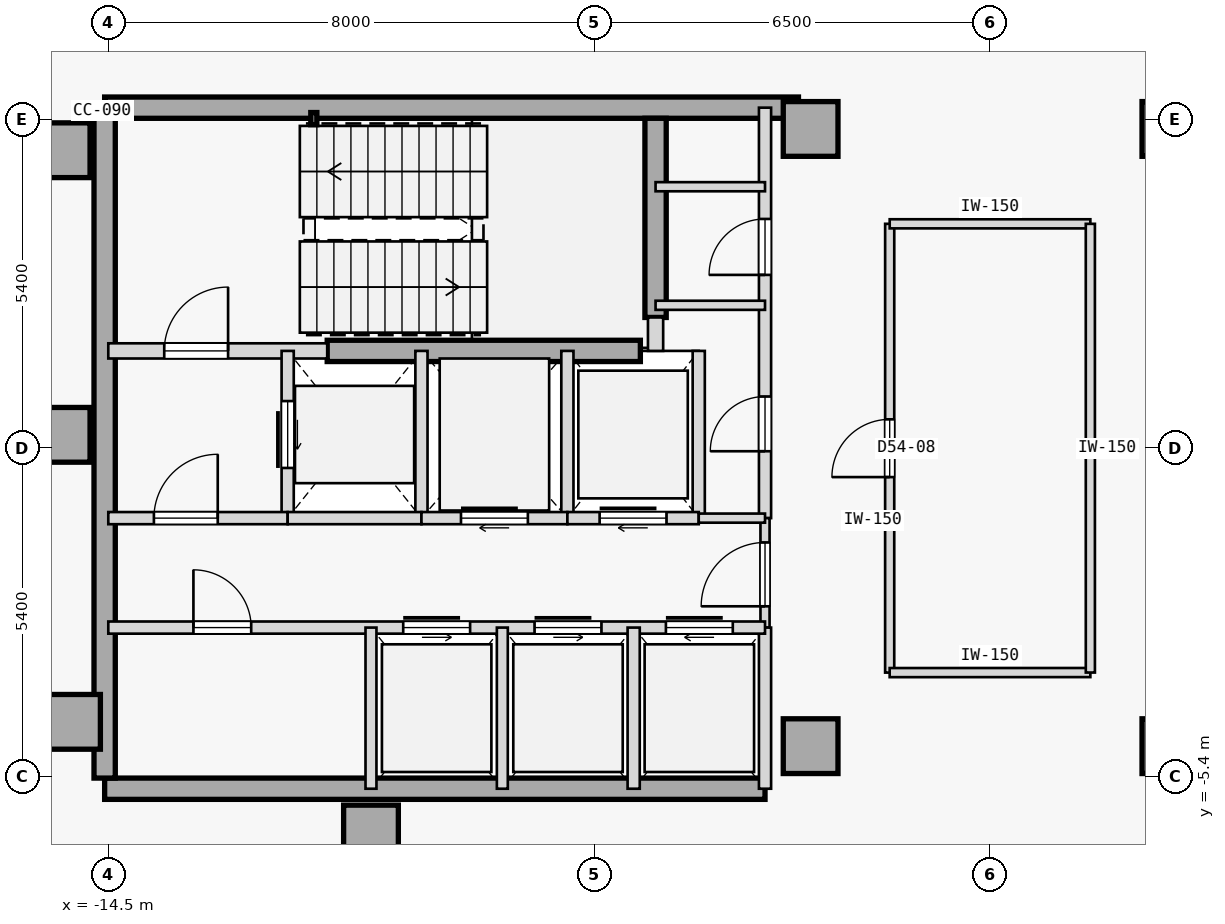
"""IFC4 building model, lengths in metres.
Left out: names, types, materials, properties, quantities, classifications, styles, units other than length and angle.
Written with IfcOpenShell. Run it as: python <this file> out.ifc"""

import sys

from ifc_helpers import new_model, si_unit, direction, frame, frame_2d, origin, origin_2d, place, context, subcontext, project, spatial, rectangle, hollow_rectangle, extrude, element, fill, save


model = new_model("IFC4")
c1 = context("Model", 3, precision=1e-05, world=origin(), true_north=direction((0.0, 1.0)))
c2 = subcontext(c1, "Body", "Model", "MODEL_VIEW")
j1 = project(units=[si_unit("LENGTHUNIT", "METRE"), si_unit("PLANEANGLEUNIT", "RADIAN")], contexts=[c1])
p1 = place(None, origin())
s1 = spatial("IfcSite", under=j1, at=p1, CompositionType="ELEMENT")
p2 = place(p1, origin())
s2 = spatial("IfcBuilding", under=s1, at=p2, CompositionType="ELEMENT")
p3 = place(p2, frame((0.0, 0.0, 206.8)))
s3 = spatial("IfcBuildingStorey", under=s2, at=p3, CompositionType="ELEMENT", Elevation=206.8)
for number, where, z_axis, x_axis in (
    (1, (-15.25, 4.9, 0.0), (0.0, 0.0, 1.0), (1.0, 0.0, 0.0)),
    (2, (-15.25, 0.22, 0.0), (0.0, 0.0, 1.0), (1.0, 0.0, 0.0)),
    (3, (-15.08, -4.5, 0.0), (0.0, 0.0, 1.0), (1.0, 0.0, 0.0)),
    (4, (-10.18, -6.32, 0.0), (0.0, 0.0, 1.0), (1.0, 0.0, 0.0)),
    (5, (-2.95, -4.9, 0.0), (0.0, 0.0, 1.0), (1.0, 0.0, 0.0)),
    (6, (-2.95, 5.25, 0.0), (0.0, 0.0, 1.0), (1.0, 0.0, 0.0)),
    (7, (2.95, -4.9, 0.0), (0.0, 0.0, 1.0), (1.0, 0.0, 0.0)),
    (8, (2.95, 5.25, 0.0), (0.0, 0.0, 1.0), (1.0, 0.0, 0.0)),
):
    element("IfcColumn", number, at=place(p3, frame(where, z_axis=z_axis, x_axis=x_axis)), inside=s3, PredefinedType="COLUMN", context=c2, shape_type="SweptSolid", body=[
        extrude(rectangle(XDim=0.9, YDim=0.9, at=origin_2d()), origin(), (0.0, 0.0, 1.0), 4.1),
    ])
p4 = place(p3, frame((-14.56, 5.6, 0.0), z_axis=(0.0, 0.0, 1.0), x_axis=(1.0, 0.0, 0.0)))
e9 = element("IfcWall", 9, at=p4, inside=s3, PredefinedType="SHEAR", context=c2, shape_type="SweptSolid", body=[
    extrude(rectangle(XDim=11.41, YDim=0.35, at=frame_2d((5.705, 0.0))), origin(), (0.0, 0.0, 1.0), 3.875),
])
p5 = place(p3, frame((-14.56, -5.6, 0.0), z_axis=(0.0, 0.0, 1.0), x_axis=(1.0, 0.0, 0.0)))
e10 = element("IfcWall", 10, at=p5, inside=s3, PredefinedType="SHEAR", context=c2, shape_type="SweptSolid", body=[
    extrude(rectangle(XDim=10.86, YDim=0.35, at=frame_2d((5.43, 0.0))), origin(), (0.0, 0.0, 1.0), 3.875),
])
p6 = place(p3, frame((-14.56, -5.425, 0.0), z_axis=(0.0, 0.0, 1.0), x_axis=(0.0, 1.0, 0.0)))
e11 = element("IfcWall", 11, at=p6, inside=s3, PredefinedType="SHEAR", context=c2, shape_type="SweptSolid", body=[
    extrude(rectangle(XDim=10.85, YDim=0.35, at=frame_2d((5.425, 0.0))), origin(), (0.0, 0.0, 1.0), 3.875),
])
p7 = place(p3, frame((-5.5, 2.15, 0.0), z_axis=(0.0, 0.0, 1.0), x_axis=(0.0, 1.0, 0.0)))
e12 = element("IfcWall", 12, at=p7, inside=s3, PredefinedType="SHEAR", context=c2, shape_type="SweptSolid", body=[
    extrude(rectangle(XDim=3.275, YDim=0.35, at=frame_2d((1.638, 0.0))), origin(), (0.0, 0.0, 1.0), 3.875),
])
p8 = place(p3, frame((-10.9, 1.6, 0.0), z_axis=(0.0, 0.0, 1.0), x_axis=(1.0, 0.0, 0.0)))
e13 = element("IfcWall", 13, at=p8, inside=s3, PredefinedType="SHEAR", context=c2, shape_type="SweptSolid", body=[
    extrude(rectangle(XDim=5.15, YDim=0.35, at=frame_2d((2.575, 0.0))), origin(), (0.0, 0.0, 1.0), 3.875),
])
p9 = place(p3, frame((-11.12, 5.42, 0.0), z_axis=(0.0, 0.0, 1.0), x_axis=(1.0, 0.0, 0.0)))
e14 = element("IfcColumn", 14, at=p9, inside=s3, PredefinedType="COLUMN", context=c2, shape_type="SweptSolid", body=[
    extrude(hollow_rectangle(XDim=0.1, YDim=0.2, WallThickness=0.008, at=origin_2d()), origin(), (0.0, 0.0, 1.0), 4.1),
])
p10 = place(p3, frame((-14.5, 1.6, 0.0), z_axis=(0.0, 0.0, 1.0), x_axis=(1.0, 0.0, 0.0)))
e15 = element("IfcWall", 15, at=p10, inside=s3, PredefinedType="STANDARD", context=c2, shape_type="SweptSolid", body=[
    extrude(rectangle(XDim=3.6, YDim=0.25, at=frame_2d((1.8, 0.0))), origin(), (0.0, 0.0, 1.0), 3.875),
])
p11 = place(p10, frame((0.92, 0.0, 0.0)))
e16 = element("IfcOpeningElement", 16, at=p11, cuts=e15, PredefinedType="OPENING", context=c2, shape_type="SweptSolid", body=[
    extrude(rectangle(XDim=1.05, YDim=2.15, at=frame_2d((0.525, 1.075))), frame((0.0, 0.135, 0.0), z_axis=(0.0, -1.0, 0.0), x_axis=(1.0, 0.0, 0.0)), (0.0, 0.0, 1.0), 0.27),
])
p12 = place(p3, frame((-5.5, 1.6, 0.0), z_axis=(0.0, 0.0, 1.0), x_axis=(0.0, 1.0, 0.0)))
e17 = element("IfcWall", 17, at=p12, inside=s3, PredefinedType="STANDARD", context=c2, shape_type="SweptSolid", body=[
    extrude(rectangle(XDim=0.55, YDim=0.25, at=frame_2d((0.275, 0.0))), origin(), (0.0, 0.0, 1.0), 3.875),
])
p13 = place(p3, frame((-3.7, -1.15, 0.0), z_axis=(0.0, 0.0, 1.0), x_axis=(0.0, 1.0, 0.0)))
e18 = element("IfcWall", 18, at=p13, inside=s3, PredefinedType="STANDARD", context=c2, shape_type="SweptSolid", body=[
    extrude(rectangle(XDim=6.75, YDim=0.2, at=frame_2d((3.375, 0.0))), origin(), (0.0, 0.0, 1.0), 3.875),
])
p14 = place(p13, frame((1.1, 0.0, 0.0)))
e19 = element("IfcOpeningElement", 19, at=p14, cuts=e18, PredefinedType="OPENING", context=c2, shape_type="SweptSolid", body=[
    extrude(rectangle(XDim=0.9, YDim=2.15, at=frame_2d((0.45, 1.075))), frame((0.0, 0.11, 0.0), z_axis=(0.0, -1.0, 0.0), x_axis=(1.0, 0.0, 0.0)), (0.0, 0.0, 1.0), 0.22),
])
p15 = place(p13, frame((4.0, 0.0, 0.0)))
e20 = element("IfcOpeningElement", 20, at=p15, cuts=e18, PredefinedType="OPENING", context=c2, shape_type="SweptSolid", body=[
    extrude(rectangle(XDim=0.92, YDim=2.15, at=frame_2d((0.46, 1.075))), frame((0.0, 0.11, 0.0), z_axis=(0.0, -1.0, 0.0), x_axis=(1.0, 0.0, 0.0)), (0.0, 0.0, 1.0), 0.22),
])
p16 = place(p3, frame((-3.7, -2.95, 0.0), z_axis=(0.0, 0.0, 1.0), x_axis=(0.0, 1.0, 0.0)))
e21 = element("IfcWall", 21, at=p16, inside=s3, PredefinedType="PARTITIONING", context=c2, shape_type="SweptSolid", body=[
    extrude(rectangle(XDim=1.8, YDim=0.15, at=frame_2d((0.9, 0.0))), origin(), (0.0, 0.0, 1.0), 3.875),
])
p17 = place(p16, frame((0.35, 0.0, 0.0)))
e22 = element("IfcOpeningElement", 22, at=p17, cuts=e21, PredefinedType="OPENING", context=c2, shape_type="SweptSolid", body=[
    extrude(rectangle(XDim=1.05, YDim=2.18, at=frame_2d((0.525, 1.09))), frame((0.0, 0.085, 0.0), z_axis=(0.0, -1.0, 0.0), x_axis=(1.0, 0.0, 0.0)), (0.0, 0.0, 1.0), 0.17),
])
p18 = place(p3, frame((-3.7, -5.6, 0.0), z_axis=(0.0, 0.0, 1.0), x_axis=(0.0, 1.0, 0.0)))
e23 = element("IfcWall", 23, at=p18, inside=s3, PredefinedType="STANDARD", context=c2, shape_type="SweptSolid", body=[
    extrude(rectangle(XDim=2.65, YDim=0.2, at=frame_2d((1.325, 0.0))), origin(), (0.0, 0.0, 1.0), 3.875),
])
p19 = place(p3, frame((-11.55, -1.15, 0.0), z_axis=(0.0, 0.0, 1.0), x_axis=(0.0, 1.0, 0.0)))
e24 = element("IfcWall", 24, at=p19, inside=s3, PredefinedType="STANDARD", context=c2, shape_type="SweptSolid", body=[
    extrude(rectangle(XDim=2.75, YDim=0.2, at=frame_2d((1.375, 0.0))), origin(), (0.0, 0.0, 1.0), 3.875),
])
p20 = place(p19, frame((0.825, 0.0, 0.0)))
e25 = element("IfcOpeningElement", 25, at=p20, cuts=e24, PredefinedType="OPENING", context=c2, shape_type="SweptSolid", body=[
    extrude(rectangle(XDim=1.1, YDim=2.15, at=frame_2d((0.55, 1.075))), frame((0.0, 0.11, 0.0), z_axis=(0.0, -1.0, 0.0), x_axis=(1.0, 0.0, 0.0)), (0.0, 0.0, 1.0), 0.22),
])
p21 = place(p3, frame((-9.35, -1.15, 0.0), z_axis=(0.0, 0.0, 1.0), x_axis=(0.0, 1.0, 0.0)))
e26 = element("IfcWall", 26, at=p21, inside=s3, PredefinedType="STANDARD", context=c2, shape_type="SweptSolid", body=[
    extrude(rectangle(XDim=2.75, YDim=0.2, at=frame_2d((1.375, 0.0))), origin(), (0.0, 0.0, 1.0), 3.875),
])
p22 = place(p3, frame((-14.5, -1.15, 0.0), z_axis=(0.0, 0.0, 1.0), x_axis=(1.0, 0.0, 0.0)))
e27 = element("IfcWall", 27, at=p22, inside=s3, PredefinedType="STANDARD", context=c2, shape_type="SweptSolid", body=[
    extrude(rectangle(XDim=2.95, YDim=0.2, at=frame_2d((1.475, 0.0))), origin(), (0.0, 0.0, 1.0), 3.875),
])
p23 = place(p22, frame((0.75, 0.0, 0.0)))
e28 = element("IfcOpeningElement", 28, at=p23, cuts=e27, PredefinedType="OPENING", context=c2, shape_type="SweptSolid", body=[
    extrude(rectangle(XDim=1.05, YDim=2.18, at=frame_2d((0.525, 1.09))), frame((0.0, 0.11, 0.0), z_axis=(0.0, -1.0, 0.0), x_axis=(1.0, 0.0, 0.0)), (0.0, 0.0, 1.0), 0.22),
])
p24 = place(p3, frame((-11.55, -1.15, 0.0), z_axis=(0.0, 0.0, 1.0), x_axis=(1.0, 0.0, 0.0)))
e29 = element("IfcWall", 29, at=p24, inside=s3, PredefinedType="STANDARD", context=c2, shape_type="SweptSolid", body=[
    extrude(rectangle(XDim=2.2, YDim=0.2, at=frame_2d((1.1, 0.0))), origin(), (0.0, 0.0, 1.0), 3.875),
])
p25 = place(p3, frame((-6.95, -1.15, 0.0), z_axis=(0.0, 0.0, 1.0), x_axis=(0.0, 1.0, 0.0)))
e30 = element("IfcWall", 30, at=p25, inside=s3, PredefinedType="STANDARD", context=c2, shape_type="SweptSolid", body=[
    extrude(rectangle(XDim=2.75, YDim=0.2, at=frame_2d((1.375, 0.0))), origin(), (0.0, 0.0, 1.0), 3.875),
])
p26 = place(p3, frame((-9.35, -1.15, 0.0), z_axis=(0.0, 0.0, 1.0), x_axis=(1.0, 0.0, 0.0)))
e31 = element("IfcWall", 31, at=p26, inside=s3, PredefinedType="STANDARD", context=c2, shape_type="SweptSolid", body=[
    extrude(rectangle(XDim=2.4, YDim=0.2, at=frame_2d((1.2, 0.0))), origin(), (0.0, 0.0, 1.0), 3.875),
])
p27 = place(p26, frame((0.65, 0.0, 0.0)))
e32 = element("IfcOpeningElement", 32, at=p27, cuts=e31, PredefinedType="OPENING", context=c2, shape_type="SweptSolid", body=[
    extrude(rectangle(XDim=1.1, YDim=2.15, at=frame_2d((0.55, 1.075))), frame((0.0, 0.11, 0.0), z_axis=(0.0, -1.0, 0.0), x_axis=(1.0, 0.0, 0.0)), (0.0, 0.0, 1.0), 0.22),
])
p28 = place(p3, frame((-4.79, -1.15, 0.0), z_axis=(0.0, 0.0, 1.0), x_axis=(0.0, 1.0, 0.0)))
e33 = element("IfcWall", 33, at=p28, inside=s3, PredefinedType="STANDARD", context=c2, shape_type="SweptSolid", body=[
    extrude(rectangle(XDim=2.75, YDim=0.2, at=frame_2d((1.375, 0.0))), origin(), (0.0, 0.0, 1.0), 3.875),
])
p29 = place(p3, frame((-6.95, -1.15, 0.0), z_axis=(0.0, 0.0, 1.0), x_axis=(1.0, 0.0, 0.0)))
e34 = element("IfcWall", 34, at=p29, inside=s3, PredefinedType="STANDARD", context=c2, shape_type="SweptSolid", body=[
    extrude(rectangle(XDim=2.16, YDim=0.2, at=frame_2d((1.08, 0.0))), origin(), (0.0, 0.0, 1.0), 3.875),
])
p30 = place(p29, frame((0.53, 0.0, 0.0)))
e35 = element("IfcOpeningElement", 35, at=p30, cuts=e34, PredefinedType="OPENING", context=c2, shape_type="SweptSolid", body=[
    extrude(rectangle(XDim=1.1, YDim=2.15, at=frame_2d((0.55, 1.075))), frame((0.0, 0.11, 0.0), z_axis=(0.0, -1.0, 0.0), x_axis=(1.0, 0.0, 0.0)), (0.0, 0.0, 1.0), 0.22),
])
p31 = place(p3, frame((-4.79, -1.15, 0.0), z_axis=(0.0, 0.0, 1.0), x_axis=(1.0, 0.0, 0.0)))
e36 = element("IfcWall", 36, at=p31, inside=s3, PredefinedType="PARTITIONING", context=c2, shape_type="SweptSolid", body=[
    extrude(rectangle(XDim=1.09, YDim=0.15, at=frame_2d((0.545, 0.0))), origin(), (0.0, 0.0, 1.0), 3.875),
])
p32 = place(p3, frame((-14.5, -2.95, 0.0), z_axis=(0.0, 0.0, 1.0), x_axis=(1.0, 0.0, 0.0)))
e37 = element("IfcWall", 37, at=p32, inside=s3, PredefinedType="STANDARD", context=c2, shape_type="SweptSolid", body=[
    extrude(rectangle(XDim=10.8, YDim=0.2, at=frame_2d((5.4, 0.0))), origin(), (0.0, 0.0, 1.0), 3.875),
])
p33 = place(p32, frame((4.85, 0.0, 0.0)))
e38 = element("IfcOpeningElement", 38, at=p33, cuts=e37, PredefinedType="OPENING", context=c2, shape_type="SweptSolid", body=[
    extrude(rectangle(XDim=1.1, YDim=2.15, at=frame_2d((0.55, 1.075))), frame((0.0, 0.11, 0.0), z_axis=(0.0, -1.0, 0.0), x_axis=(1.0, 0.0, 0.0)), (0.0, 0.0, 1.0), 0.22),
])
p34 = place(p32, frame((7.01, 0.0, 0.0)))
e39 = element("IfcOpeningElement", 39, at=p34, cuts=e37, PredefinedType="OPENING", context=c2, shape_type="SweptSolid", body=[
    extrude(rectangle(XDim=1.1, YDim=2.15, at=frame_2d((0.55, 1.075))), frame((0.0, 0.11, 0.0), z_axis=(0.0, -1.0, 0.0), x_axis=(1.0, 0.0, 0.0)), (0.0, 0.0, 1.0), 0.22),
])
p35 = place(p32, frame((9.17, 0.0, 0.0)))
e40 = element("IfcOpeningElement", 40, at=p35, cuts=e37, PredefinedType="OPENING", context=c2, shape_type="SweptSolid", body=[
    extrude(rectangle(XDim=1.1, YDim=2.15, at=frame_2d((0.55, 1.075))), frame((0.0, 0.11, 0.0), z_axis=(0.0, -1.0, 0.0), x_axis=(1.0, 0.0, 0.0)), (0.0, 0.0, 1.0), 0.22),
])
p36 = place(p32, frame((1.4, 0.0, 0.0)))
e41 = element("IfcOpeningElement", 41, at=p36, cuts=e37, PredefinedType="OPENING", context=c2, shape_type="SweptSolid", body=[
    extrude(rectangle(XDim=0.95, YDim=2.15, at=frame_2d((0.475, 1.075))), frame((0.0, 0.11, 0.0), z_axis=(0.0, -1.0, 0.0), x_axis=(1.0, 0.0, 0.0)), (0.0, 0.0, 1.0), 0.22),
])
p37 = place(p3, frame((-5.86, -5.6, 0.0), z_axis=(0.0, 0.0, 1.0), x_axis=(0.0, 1.0, 0.0)))
e42 = element("IfcWall", 42, at=p37, inside=s3, PredefinedType="STANDARD", context=c2, shape_type="SweptSolid", body=[
    extrude(rectangle(XDim=2.65, YDim=0.2, at=frame_2d((1.325, 0.0))), origin(), (0.0, 0.0, 1.0), 3.875),
])
for number, where, z_axis, x_axis in (
    (43, (-10.18, -5.6, 0.0), (0.0, 0.0, 1.0), (0.0, 1.0, 0.0)),
    (44, (-8.02, -5.6, 0.0), (0.0, 0.0, 1.0), (0.0, 1.0, 0.0)),
):
    element("IfcWall", number, at=place(p3, frame(where, z_axis=z_axis, x_axis=x_axis)), inside=s3, PredefinedType="STANDARD", context=c2, shape_type="SweptSolid", body=[
        extrude(rectangle(XDim=2.65, YDim=0.18, at=frame_2d((1.325, 0.0))), origin(), (0.0, 0.0, 1.0), 3.875),
    ])
for number, where, z_axis, x_axis in (
    (45, (-5.5, 4.3, 0.0), (0.0, 0.0, 1.0), (1.0, 0.0, 0.0)),
    (46, (-5.5, 2.35, 0.0), (0.0, 0.0, 1.0), (1.0, 0.0, 0.0)),
):
    element("IfcWall", number, at=place(p3, frame(where, z_axis=z_axis, x_axis=x_axis)), inside=s3, PredefinedType="PARTITIONING", context=c2, shape_type="SweptSolid", body=[
        extrude(rectangle(XDim=1.8, YDim=0.15, at=frame_2d((0.9, 0.0))), origin(), (0.0, 0.0, 1.0), 3.875),
    ])
p38 = place(p3, frame((-1.65, -3.69, 0.0), z_axis=(0.0, 0.0, 1.0), x_axis=(3.3079722e-05, 0.999999999453, 0.0)))
e47 = element("IfcWall", 47, at=p38, inside=s3, PredefinedType="PARTITIONING", context=c2, shape_type="SweptSolid", body=[
    extrude(rectangle(XDim=7.38, YDim=0.15, at=frame_2d((3.69, 0.0))), origin(), (0.0, 0.0, 1.0), 3.875),
])
p39 = place(p38, frame((3.215, 0.0, 0.0)))
e48 = element("IfcOpeningElement", 48, at=p39, cuts=e47, PredefinedType="OPENING", context=c2, shape_type="SweptSolid", body=[
    extrude(rectangle(XDim=0.95, YDim=2.15, at=frame_2d((0.475, 1.075))), frame((0.0, 0.085, 0.0), z_axis=(0.0, -1.0, 0.0), x_axis=(1.0, 0.0, 0.0)), (0.0, 0.0, 1.0), 0.17),
])
p40 = place(p3, frame((-1.65, -3.69, 0.0), z_axis=(0.0, 0.0, 1.0), x_axis=(0.999999956221, 0.000295901748, 0.0)))
e49 = element("IfcWall", 49, at=p40, inside=s3, PredefinedType="PARTITIONING", context=c2, shape_type="SweptSolid", body=[
    extrude(rectangle(XDim=3.3, YDim=0.15, at=frame_2d((1.65, 0.0))), origin(), (0.0, 0.0, 1.0), 3.875),
])
p41 = place(p3, frame((-1.65, 3.69, 0.0), z_axis=(0.0, 0.0, 1.0), x_axis=(0.999999997263, -7.3991861e-05, 0.0)))
e50 = element("IfcWall", 50, at=p41, inside=s3, PredefinedType="PARTITIONING", context=c2, shape_type="SweptSolid", body=[
    extrude(rectangle(XDim=3.3, YDim=0.15, at=frame_2d((1.65, 0.0))), origin(), (0.0, 0.0, 1.0), 3.875),
])
p42 = place(p3, frame((1.65, -3.689, 0.0), z_axis=(0.0, 0.0, 1.0), x_axis=(-6.6170389e-05, 0.999999997811, 0.0)))
e51 = element("IfcWall", 51, at=p42, inside=s3, PredefinedType="PARTITIONING", context=c2, shape_type="SweptSolid", body=[
    extrude(rectangle(XDim=7.379, YDim=0.15, at=frame_2d((3.689, 0.0))), origin(), (0.0, 0.0, 1.0), 3.875),
])
p43 = place(p3, frame((-15.404, -8.927, 0.0), z_axis=(0.0, 0.0, 1.0), x_axis=(-0.309002477631, 0.951061232949, 0.0)))
e52 = element("IfcWall", 52, at=p43, inside=s3, PredefinedType="PARTITIONING", context=c2, shape_type="SweptSolid", body=[
    extrude(rectangle(XDim=15.387, YDim=0.15, at=frame_2d((7.693, 0.0))), origin(), (0.0, 0.0, 1.0), 3.875),
])
p44 = place(p43, frame((7.219, 0.0, 0.0)))
e53 = element("IfcOpeningElement", 53, at=p44, cuts=e52, PredefinedType="OPENING", context=c2, shape_type="SweptSolid", body=[
    extrude(rectangle(XDim=0.95, YDim=2.15, at=frame_2d((0.475, 1.075))), frame((0.0, 0.085, 0.0), z_axis=(0.0, -1.0, 0.0), x_axis=(1.0, 0.0, 0.0)), (0.0, 0.0, 1.0), 0.17),
])
p45 = place(p11, origin())
e54 = element("IfcDoor", 54, at=p45, inside=s3, OperationType="SINGLE_SWING_RIGHT", PredefinedType="DOOR", context=c2, shape_type="SweptSolid", body=[
    extrude(rectangle(XDim=1.05, YDim=2.15, at=frame_2d((0.525, 1.075))), frame((0.0, 0.025, 0.0), z_axis=(0.0, -1.0, 0.0), x_axis=(1.0, 0.0, 0.0)), (0.0, 0.0, 1.0), 0.05),
])
fill(e16, e54)
p46 = place(p23, origin())
e55 = element("IfcDoor", 55, at=p46, inside=s3, OperationType="SINGLE_SWING_RIGHT", PredefinedType="DOOR", context=c2, shape_type="SweptSolid", body=[
    extrude(rectangle(XDim=1.05, YDim=2.18, at=frame_2d((0.525, 1.09))), frame((0.0, 0.025, 0.0), z_axis=(0.0, -1.0, 0.0), x_axis=(1.0, 0.0, 0.0)), (0.0, 0.0, 1.0), 0.05),
])
fill(e28, e55)
p47 = place(p17, origin())
e56 = element("IfcDoor", 56, at=p47, inside=s3, OperationType="SINGLE_SWING_LEFT", PredefinedType="DOOR", context=c2, shape_type="SweptSolid", body=[
    extrude(rectangle(XDim=1.05, YDim=2.18, at=frame_2d((0.525, 1.09))), frame((0.0, 0.025, 0.0), z_axis=(0.0, -1.0, 0.0), x_axis=(1.0, 0.0, 0.0)), (0.0, 0.0, 1.0), 0.05),
])
fill(e22, e56)
p48 = place(p20, origin())
e57 = element("IfcDoor", 57, at=p48, inside=s3, OperationType="SLIDING_TO_RIGHT", PredefinedType="DOOR", context=c2, shape_type="SweptSolid", body=[
    extrude(rectangle(XDim=1.1, YDim=2.15, at=frame_2d((0.55, 1.075))), frame((0.0, 0.025, 0.0), z_axis=(0.0, -1.0, 0.0), x_axis=(1.0, 0.0, 0.0)), (0.0, 0.0, 1.0), 0.05),
])
fill(e25, e57)
p49 = place(p27, origin())
e58 = element("IfcDoor", 58, at=p49, inside=s3, OperationType="SLIDING_TO_RIGHT", PredefinedType="DOOR", context=c2, shape_type="SweptSolid", body=[
    extrude(rectangle(XDim=1.1, YDim=2.15, at=frame_2d((0.55, 1.075))), frame((0.0, 0.025, 0.0), z_axis=(0.0, -1.0, 0.0), x_axis=(1.0, 0.0, 0.0)), (0.0, 0.0, 1.0), 0.05),
])
fill(e32, e58)
p50 = place(p30, origin())
e59 = element("IfcDoor", 59, at=p50, inside=s3, OperationType="SLIDING_TO_RIGHT", PredefinedType="DOOR", context=c2, shape_type="SweptSolid", body=[
    extrude(rectangle(XDim=1.1, YDim=2.15, at=frame_2d((0.55, 1.075))), frame((0.0, 0.025, 0.0), z_axis=(0.0, -1.0, 0.0), x_axis=(1.0, 0.0, 0.0)), (0.0, 0.0, 1.0), 0.05),
])
fill(e35, e59)
p51 = place(p33, origin())
e60 = element("IfcDoor", 60, at=p51, inside=s3, OperationType="SLIDING_TO_LEFT", PredefinedType="DOOR", context=c2, shape_type="SweptSolid", body=[
    extrude(rectangle(XDim=1.1, YDim=2.15, at=frame_2d((0.55, 1.075))), frame((0.0, 0.025, 0.0), z_axis=(0.0, -1.0, 0.0), x_axis=(1.0, 0.0, 0.0)), (0.0, 0.0, 1.0), 0.05),
])
fill(e38, e60)
p52 = place(p34, origin())
e61 = element("IfcDoor", 61, at=p52, inside=s3, OperationType="SLIDING_TO_LEFT", PredefinedType="DOOR", context=c2, shape_type="SweptSolid", body=[
    extrude(rectangle(XDim=1.1, YDim=2.15, at=frame_2d((0.55, 1.075))), frame((0.0, 0.025, 0.0), z_axis=(0.0, -1.0, 0.0), x_axis=(1.0, 0.0, 0.0)), (0.0, 0.0, 1.0), 0.05),
])
fill(e39, e61)
p53 = place(p35, origin())
e62 = element("IfcDoor", 62, at=p53, inside=s3, OperationType="SLIDING_TO_RIGHT", PredefinedType="DOOR", context=c2, shape_type="SweptSolid", body=[
    extrude(rectangle(XDim=1.1, YDim=2.15, at=frame_2d((0.55, 1.075))), frame((0.0, 0.025, 0.0), z_axis=(0.0, -1.0, 0.0), x_axis=(1.0, 0.0, 0.0)), (0.0, 0.0, 1.0), 0.05),
])
fill(e40, e62)
p54 = place(p36, origin())
e63 = element("IfcDoor", 63, at=p54, inside=s3, OperationType="SINGLE_SWING_LEFT", PredefinedType="DOOR", context=c2, shape_type="SweptSolid", body=[
    extrude(rectangle(XDim=0.95, YDim=2.15, at=frame_2d((0.475, 1.075))), frame((0.0, 0.025, 0.0), z_axis=(0.0, -1.0, 0.0), x_axis=(1.0, 0.0, 0.0)), (0.0, 0.0, 1.0), 0.05),
])
fill(e41, e63)
p55 = place(p14, origin())
e64 = element("IfcDoor", 64, at=p55, inside=s3, OperationType="SINGLE_SWING_LEFT", PredefinedType="DOOR", context=c2, shape_type="SweptSolid", body=[
    extrude(rectangle(XDim=0.9, YDim=2.15, at=frame_2d((0.45, 1.075))), frame((0.0, 0.025, 0.0), z_axis=(0.0, -1.0, 0.0), x_axis=(1.0, 0.0, 0.0)), (0.0, 0.0, 1.0), 0.05),
])
fill(e19, e64)
p56 = place(p15, origin())
e65 = element("IfcDoor", 65, at=p56, inside=s3, OperationType="SINGLE_SWING_LEFT", PredefinedType="DOOR", context=c2, shape_type="SweptSolid", body=[
    extrude(rectangle(XDim=0.92, YDim=2.15, at=frame_2d((0.46, 1.075))), frame((0.0, 0.025, 0.0), z_axis=(0.0, -1.0, 0.0), x_axis=(1.0, 0.0, 0.0)), (0.0, 0.0, 1.0), 0.05),
])
fill(e20, e65)
p57 = place(p39, origin())
e66 = element("IfcDoor", 66, at=p57, inside=s3, OperationType="SINGLE_SWING_LEFT", PredefinedType="DOOR", context=c2, shape_type="SweptSolid", body=[
    extrude(rectangle(XDim=0.95, YDim=2.15, at=frame_2d((0.475, 1.075))), frame((0.0, 0.025, 0.0), z_axis=(0.0, -1.0, 0.0), x_axis=(1.0, 0.0, 0.0)), (0.0, 0.0, 1.0), 0.05),
])
fill(e48, e66)
save(model, sys.argv[1])
